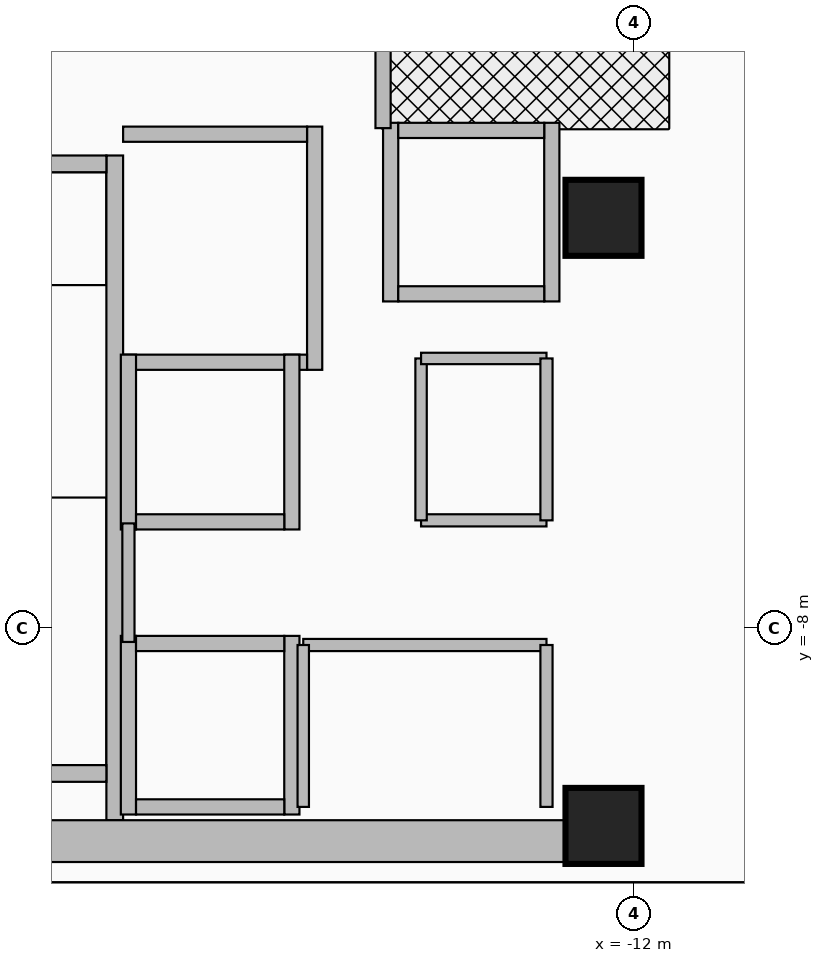
"""IFC4 building model, lengths in metres.
Left out: names, types, materials, properties, quantities, classifications, styles, units other than length and angle.
Written with IfcOpenShell. Run it as: python <this file> out.ifc"""

import sys

from ifc_helpers import new_model, si_unit, direction, frame, frame_2d, origin, origin_2d, place, context, subcontext, project, spatial, rectangle, extrude, source, transform, mapped, element, fill, save


model = new_model("IFC4")
c1 = context("Model", 3, precision=1e-05, world=origin(), true_north=direction((0.0, 1.0)))
c2 = subcontext(c1, "Body", "Model", "MODEL_VIEW")
j1 = project(units=[si_unit("LENGTHUNIT", "METRE"), si_unit("PLANEANGLEUNIT", "RADIAN")], contexts=[c1])
p1 = place(None, origin())
s1 = spatial("IfcSite", under=j1, at=p1, CompositionType="ELEMENT")
p2 = place(p1, origin())
s2 = spatial("IfcBuilding", under=s1, at=p2, CompositionType="ELEMENT")
p3 = place(p2, frame((0.0, 0.0, 180.5)))
s3 = spatial("IfcBuildingStorey", under=s2, at=p3, CompositionType="ELEMENT", Elevation=180.5)
p4 = place(p3, frame((-18.83, -10.525, 0.0), z_axis=(0.0, 0.0, 1.0), x_axis=(0.0, 1.0, 0.0)))
e1 = element("IfcWall", 1, at=p4, inside=s3, PredefinedType="SHEAR", context=c2, shape_type="SweptSolid", body=[
    extrude(rectangle(XDim=8.745, YDim=0.22, at=frame_2d((4.373, 0.0))), origin(), (0.0, 0.0, 1.0), 3.63),
])
p5 = place(p3, frame((-22.05, -9.91, 0.0), z_axis=(0.0, 0.0, 1.0), x_axis=(1.0, 0.0, 0.0)))
e2 = element("IfcWall", 2, at=p5, inside=s3, PredefinedType="SHEAR", context=c2, shape_type="SweptSolid", body=[
    extrude(rectangle(XDim=3.11, YDim=0.22, at=frame_2d((1.555, 0.0))), origin(), (0.0, 0.0, 1.0), 3.63),
])
p6 = place(p3, frame((-22.05, -1.89, 0.0), z_axis=(0.0, 0.0, 1.0), x_axis=(1.0, 0.0, 0.0)))
e3 = element("IfcWall", 3, at=p6, inside=s3, PredefinedType="SHEAR", context=c2, shape_type="SweptSolid", body=[
    extrude(rectangle(XDim=3.11, YDim=0.22, at=frame_2d((1.555, 0.0))), origin(), (0.0, 0.0, 1.0), 3.63),
])
p7 = place(p6, frame((1.0, 0.0, 0.0)))
e4 = element("IfcOpeningElement", 4, at=p7, cuts=e3, PredefinedType="OPENING", context=c2, shape_type="SweptSolid", body=[
    extrude(rectangle(XDim=1.1, YDim=2.15, at=frame_2d((0.55, 1.075))), frame((0.0, 0.125, 0.0), z_axis=(0.0, -1.0, 0.0), x_axis=(1.0, 0.0, 0.0)), (0.0, 0.0, 1.0), 0.25),
])
p8 = place(p3, frame((-22.65, -10.8, 0.0), z_axis=(0.0, 0.0, 1.0), x_axis=(1.0, 0.0, 0.0)))
e5 = element("IfcWall", 5, at=p8, inside=s3, PredefinedType="SHEAR", context=c2, shape_type="SweptSolid", body=[
    extrude(rectangle(XDim=10.25, YDim=0.55, at=frame_2d((5.125, 0.0))), origin(), (0.0, 0.0, 1.0), 3.63),
])
m1 = source(origin(), c2, "Body", "SweptSolid", [
    extrude(rectangle(XDim=1.0, YDim=1.0, at=origin_2d()), origin(), (0.0, 0.0, 1.0), 3.95),
])
for number, where, z_axis, x_axis in (
    (6, (-12.4, -10.6, 0.0), (0.0, 0.0, 1.0), (1.0, 0.0, 0.0)),
    (7, (-12.4, -2.6, 0.0), (0.0, 0.0, 1.0), (1.0, 0.0, 0.0)),
):
    element("IfcColumn", number, at=place(p3, frame(where, z_axis=z_axis, x_axis=x_axis)), inside=s3, PredefinedType="COLUMN", context=c2, shape_type="MappedRepresentation", body=[
        mapped(m1, transform((0.0, 0.0, 0.0), x_axis=(1.0, 0.0, 0.0), y_axis=(0.0, 1.0, 0.0), z_axis=(0.0, 0.0, 1.0), scale=1.0)),
    ])
p9 = place(p3, frame((-16.2, -4.6, 0.0), z_axis=(0.0, 0.0, 1.0), x_axis=(0.0, 1.0, 0.0)))
e8 = element("IfcWall", 8, at=p9, inside=s3, PredefinedType="MOVABLE", context=c2, shape_type="SweptSolid", body=[
    extrude(rectangle(XDim=3.2, YDim=0.2, at=frame_2d((1.6, 0.0))), origin(), (0.0, 0.0, 1.0), 3.63),
])
p10 = place(p3, frame((-18.72, -4.5, 0.0), z_axis=(0.0, 0.0, 1.0), x_axis=(1.0, 0.0, 0.0)))
e9 = element("IfcWall", 9, at=p10, inside=s3, PredefinedType="MOVABLE", context=c2, shape_type="SweptSolid", body=[
    extrude(rectangle(XDim=2.42, YDim=0.2, at=frame_2d((1.21, 0.0))), origin(), (0.0, 0.0, 1.0), 3.63),
])
p11 = place(p3, frame((-18.72, -1.5, 0.0), z_axis=(0.0, 0.0, 1.0), x_axis=(1.0, 0.0, 0.0)))
e10 = element("IfcWall", 10, at=p11, inside=s3, PredefinedType="MOVABLE", context=c2, shape_type="SweptSolid", body=[
    extrude(rectangle(XDim=2.42, YDim=0.2, at=frame_2d((1.21, 0.0))), origin(), (0.0, 0.0, 1.0), 3.63),
])
p12 = place(p11, frame((0.61, 0.0, 0.0)))
e11 = element("IfcOpeningElement", 11, at=p12, cuts=e10, PredefinedType="OPENING", context=c2, shape_type="SweptSolid", body=[
    extrude(rectangle(XDim=1.2, YDim=2.1, at=frame_2d((0.6, 1.05))), frame((0.0, 0.115, 0.0), z_axis=(0.0, -1.0, 0.0), x_axis=(1.0, 0.0, 0.0)), (0.0, 0.0, 1.0), 0.23),
])
for number, where, z_axis, x_axis in (
    (12, (-18.65, -10.45, 0.0), (0.0, 0.0, 1.0), (0.0, 1.0, 0.0)),
    (13, (-16.5, -10.45, 0.0), (0.0, 0.0, 1.0), (0.0, 1.0, 0.0)),
):
    element("IfcWall", number, at=place(p3, frame(where, z_axis=z_axis, x_axis=x_axis)), inside=s3, PredefinedType="MOVABLE", context=c2, shape_type="SweptSolid", body=[
        extrude(rectangle(XDim=2.35, YDim=0.2, at=frame_2d((1.175, 0.0))), origin(), (0.0, 0.0, 1.0), 2.665),
    ])
p13 = place(p3, frame((-18.55, -10.35, 0.0), z_axis=(0.0, 0.0, 1.0), x_axis=(1.0, 0.0, 0.0)))
e14 = element("IfcWall", 14, at=p13, inside=s3, PredefinedType="MOVABLE", context=c2, shape_type="SweptSolid", body=[
    extrude(rectangle(XDim=1.95, YDim=0.2, at=frame_2d((0.975, 0.0))), origin(), (0.0, 0.0, 1.0), 2.665),
])
p14 = place(p3, frame((-18.55, -8.2, 0.0), z_axis=(0.0, 0.0, 1.0), x_axis=(1.0, 0.0, 0.0)))
e15 = element("IfcWall", 15, at=p14, inside=s3, PredefinedType="MOVABLE", context=c2, shape_type="SweptSolid", body=[
    extrude(rectangle(XDim=1.95, YDim=0.2, at=frame_2d((0.975, 0.0))), origin(), (0.0, 0.0, 1.0), 3.63),
])
p15 = place(p14, frame((0.425, 0.0, 0.0)))
e16 = element("IfcOpeningElement", 16, at=p15, cuts=e15, PredefinedType="OPENING", context=c2, shape_type="SweptSolid", body=[
    extrude(rectangle(XDim=1.1, YDim=2.1, at=frame_2d((0.55, 1.05))), frame((0.0, 0.115, 0.0), z_axis=(0.0, -1.0, 0.0), x_axis=(1.0, 0.0, 0.0)), (0.0, 0.0, 1.0), 0.23),
])
for number, where, z_axis, x_axis in (
    (17, (-18.65, -6.7, 0.0), (0.0, 0.0, 1.0), (0.0, 1.0, 0.0)),
    (18, (-16.5, -6.7, 0.0), (0.0, 0.0, 1.0), (0.0, 1.0, 0.0)),
):
    element("IfcWall", number, at=place(p3, frame(where, z_axis=z_axis, x_axis=x_axis)), inside=s3, PredefinedType="MOVABLE", context=c2, shape_type="SweptSolid", body=[
        extrude(rectangle(XDim=2.3, YDim=0.2, at=frame_2d((1.15, 0.0))), origin(), (0.0, 0.0, 1.0), 3.63),
    ])
p16 = place(p3, frame((-18.55, -6.6, 0.0), z_axis=(0.0, 0.0, 1.0), x_axis=(1.0, 0.0, 0.0)))
e19 = element("IfcWall", 19, at=p16, inside=s3, PredefinedType="MOVABLE", context=c2, shape_type="SweptSolid", body=[
    extrude(rectangle(XDim=1.95, YDim=0.2, at=frame_2d((0.975, 0.0))), origin(), (0.0, 0.0, 1.0), 3.63),
])
for number, where, z_axis, x_axis in (
    (20, (-15.2, -3.7, 0.0), (0.0, 0.0, 1.0), (0.0, 1.0, 0.0)),
    (21, (-13.08, -3.7, 0.0), (0.0, 0.0, 1.0), (0.0, 1.0, 0.0)),
):
    element("IfcWall", number, at=place(p3, frame(where, z_axis=z_axis, x_axis=x_axis)), inside=s3, PredefinedType="MOVABLE", context=c2, shape_type="SweptSolid", body=[
        extrude(rectangle(XDim=2.35, YDim=0.2, at=frame_2d((1.175, 0.0))), origin(), (0.0, 0.0, 1.0), 3.63),
    ])
for number, where, z_axis, x_axis in (
    (22, (-15.1, -3.6, 0.0), (0.0, 0.0, 1.0), (1.0, 0.0, 0.0)),
    (23, (-15.1, -1.45, 0.0), (0.0, 0.0, 1.0), (1.0, 0.0, 0.0)),
):
    element("IfcWall", number, at=place(p3, frame(where, z_axis=z_axis, x_axis=x_axis)), inside=s3, PredefinedType="MOVABLE", context=c2, shape_type="SweptSolid", body=[
        extrude(rectangle(XDim=1.92, YDim=0.2, at=frame_2d((0.96, 0.0))), origin(), (0.0, 0.0, 1.0), 3.63),
    ])
p17 = place(p3, frame((-15.3, -1.42, 0.0), z_axis=(0.0, 0.0, 1.0), x_axis=(0.0, 1.0, 0.0)))
e24 = element("IfcWall", 24, at=p17, inside=s3, PredefinedType="PARTITIONING", context=c2, shape_type="SweptSolid", body=[
    extrude(rectangle(XDim=2.67, YDim=0.2, at=frame_2d((1.335, 0.0))), origin(), (0.0, 0.0, 1.0), 3.63),
])
p18 = place(p17, frame((0.78, 0.0, 0.0)))
e25 = element("IfcOpeningElement", 25, at=p18, cuts=e24, PredefinedType="OPENING", context=c2, shape_type="SweptSolid", body=[
    extrude(rectangle(XDim=1.05, YDim=2.15, at=frame_2d((0.525, 1.075))), frame((0.0, 0.115, 0.0), z_axis=(0.0, -1.0, 0.0), x_axis=(1.0, 0.0, 0.0)), (0.0, 0.0, 1.0), 0.23),
])
p19 = place(p3, frame((-18.65, -8.18, 0.0), z_axis=(0.0, 0.0, 1.0), x_axis=(0.0, 1.0, 0.0)))
e26 = element("IfcWall", 26, at=p19, inside=s3, PredefinedType="PARTITIONING", context=c2, shape_type="SweptSolid", body=[
    extrude(rectangle(XDim=1.56, YDim=0.16, at=frame_2d((0.78, 0.0))), origin(), (0.0, 0.0, 1.0), 3.63),
])
p20 = place(p3, frame((-16.35, -8.22, 0.0), z_axis=(0.0, 0.0, 1.0), x_axis=(1.0, 0.0, 0.0)))
e27 = element("IfcWall", 27, at=p20, inside=s3, PredefinedType="PARTITIONING", context=c2, shape_type="SweptSolid", body=[
    extrude(rectangle(XDim=3.2, YDim=0.16, at=frame_2d((1.6, 0.0))), origin(), (0.0, 0.0, 1.0), 3.63),
])
p21 = place(p20, frame((1.15, 0.0, 0.0)))
e28 = element("IfcOpeningElement", 28, at=p21, cuts=e27, PredefinedType="OPENING", context=c2, shape_type="SweptSolid", body=[
    extrude(rectangle(XDim=0.95, YDim=2.15, at=frame_2d((0.475, 1.075))), frame((0.0, 0.095, 0.0), z_axis=(0.0, -1.0, 0.0), x_axis=(1.0, 0.0, 0.0)), (0.0, 0.0, 1.0), 0.19),
])
p22 = place(p3, frame((-16.35, -10.35, 0.0), z_axis=(0.0, 0.0, 1.0), x_axis=(0.0, 1.0, 0.0)))
e29 = element("IfcWall", 29, at=p22, inside=s3, PredefinedType="PARTITIONING", context=c2, shape_type="SweptSolid", body=[
    extrude(rectangle(XDim=2.13, YDim=0.15, at=frame_2d((1.065, 0.0))), origin(), (0.0, 0.0, 1.0), 3.63),
])
p23 = place(p3, frame((-13.15, -10.35, 0.0), z_axis=(0.0, 0.0, 1.0), x_axis=(0.0, 1.0, 0.0)))
e30 = element("IfcWall", 30, at=p23, inside=s3, PredefinedType="PARTITIONING", context=c2, shape_type="SweptSolid", body=[
    extrude(rectangle(XDim=2.13, YDim=0.16, at=frame_2d((1.065, 0.0))), origin(), (0.0, 0.0, 1.0), 3.63),
])
p24 = place(p3, frame((-14.8, -6.58, 0.0), z_axis=(0.0, 0.0, 1.0), x_axis=(1.0, 0.0, 0.0)))
e31 = element("IfcWall", 31, at=p24, inside=s3, PredefinedType="PARTITIONING", context=c2, shape_type="SweptSolid", body=[
    extrude(rectangle(XDim=1.65, YDim=0.16, at=frame_2d((0.825, 0.0))), origin(), (0.0, 0.0, 1.0), 3.63),
])
p25 = place(p24, frame((0.5, 0.0, 0.0)))
e32 = element("IfcOpeningElement", 32, at=p25, cuts=e31, PredefinedType="OPENING", context=c2, shape_type="SweptSolid", body=[
    extrude(rectangle(XDim=0.85, YDim=2.05, at=frame_2d((0.425, 1.025))), frame((0.0, 0.095, 0.0), z_axis=(0.0, -1.0, 0.0), x_axis=(1.0, 0.0, 0.0)), (0.0, 0.0, 1.0), 0.19),
])
p26 = place(p3, frame((-14.8, -6.58, 0.0), z_axis=(0.0, 0.0, 1.0), x_axis=(0.0, 1.0, 0.0)))
e33 = element("IfcWall", 33, at=p26, inside=s3, PredefinedType="PARTITIONING", context=c2, shape_type="SweptSolid", body=[
    extrude(rectangle(XDim=2.13, YDim=0.15, at=frame_2d((1.065, 0.0))), origin(), (0.0, 0.0, 1.0), 3.63),
])
p27 = place(p3, frame((-14.8, -4.45, 0.0), z_axis=(0.0, 0.0, 1.0), x_axis=(1.0, 0.0, 0.0)))
e34 = element("IfcWall", 34, at=p27, inside=s3, PredefinedType="PARTITIONING", context=c2, shape_type="SweptSolid", body=[
    extrude(rectangle(XDim=1.65, YDim=0.15, at=frame_2d((0.825, 0.0))), origin(), (0.0, 0.0, 1.0), 3.63),
])
p28 = place(p3, frame((-13.15, -6.58, 0.0), z_axis=(0.0, 0.0, 1.0), x_axis=(0.0, 1.0, 0.0)))
e35 = element("IfcWall", 35, at=p28, inside=s3, PredefinedType="PARTITIONING", context=c2, shape_type="SweptSolid", body=[
    extrude(rectangle(XDim=2.13, YDim=0.16, at=frame_2d((1.065, 0.0))), origin(), (0.0, 0.0, 1.0), 3.63),
])
p29 = place(p3, frame((-23.45, -11.42, 0.0), z_axis=(0.0, 0.0, 1.0), x_axis=(1.0, 0.0, 0.0)))
e36 = element("IfcWall", 36, at=p29, inside=s3, PredefinedType="PARTITIONING", context=c2, shape_type="SweptSolid", body=[
    extrude(rectangle(XDim=13.84, YDim=0.16, at=frame_2d((6.92, 0.0))), origin(), (0.0, 0.0, 1.0), 3.004),
])
p30 = place(p12, origin())
e37 = element("IfcDoor", 37, at=p30, inside=s3, OperationType="DOUBLE_DOOR_SLIDING", PredefinedType="DOOR", context=c2, shape_type="SweptSolid", body=[
    extrude(rectangle(XDim=1.2, YDim=2.1, at=frame_2d((0.6, 1.05))), frame((0.0, 0.025, 0.0), z_axis=(0.0, -1.0, 0.0), x_axis=(1.0, 0.0, 0.0)), (0.0, 0.0, 1.0), 0.05),
])
fill(e11, e37)
p31 = place(p15, origin())
e38 = element("IfcDoor", 38, at=p31, inside=s3, OperationType="DOUBLE_DOOR_SLIDING", PredefinedType="DOOR", context=c2, shape_type="SweptSolid", body=[
    extrude(rectangle(XDim=1.1, YDim=2.1, at=frame_2d((0.55, 1.05))), frame((0.0, 0.025, 0.0), z_axis=(0.0, -1.0, 0.0), x_axis=(1.0, 0.0, 0.0)), (0.0, 0.0, 1.0), 0.05),
])
fill(e16, e38)
p32 = place(p18, origin())
e39 = element("IfcDoor", 39, at=p32, inside=s3, OperationType="SINGLE_SWING_RIGHT", PredefinedType="DOOR", context=c2, shape_type="SweptSolid", body=[
    extrude(rectangle(XDim=1.05, YDim=2.15, at=frame_2d((0.525, 1.075))), frame((0.0, 0.025, 0.0), z_axis=(0.0, -1.0, 0.0), x_axis=(1.0, 0.0, 0.0)), (0.0, 0.0, 1.0), 0.05),
])
fill(e25, e39)
p33 = place(p21, origin())
e40 = element("IfcDoor", 40, at=p33, inside=s3, OperationType="SINGLE_SWING_RIGHT", PredefinedType="DOOR", context=c2, shape_type="SweptSolid", body=[
    extrude(rectangle(XDim=0.95, YDim=2.15, at=frame_2d((0.475, 1.075))), frame((0.0, 0.025, 0.0), z_axis=(0.0, -1.0, 0.0), x_axis=(1.0, 0.0, 0.0)), (0.0, 0.0, 1.0), 0.05),
])
fill(e28, e40)
p34 = place(p25, origin())
e41 = element("IfcDoor", 41, at=p34, inside=s3, OperationType="SINGLE_SWING_LEFT", PredefinedType="DOOR", context=c2, shape_type="SweptSolid", body=[
    extrude(rectangle(XDim=0.85, YDim=2.05, at=frame_2d((0.425, 1.025))), frame((0.0, 0.025, 0.0), z_axis=(0.0, -1.0, 0.0), x_axis=(1.0, 0.0, 0.0)), (0.0, 0.0, 1.0), 0.05),
])
fill(e32, e41)
save(model, sys.argv[1])
